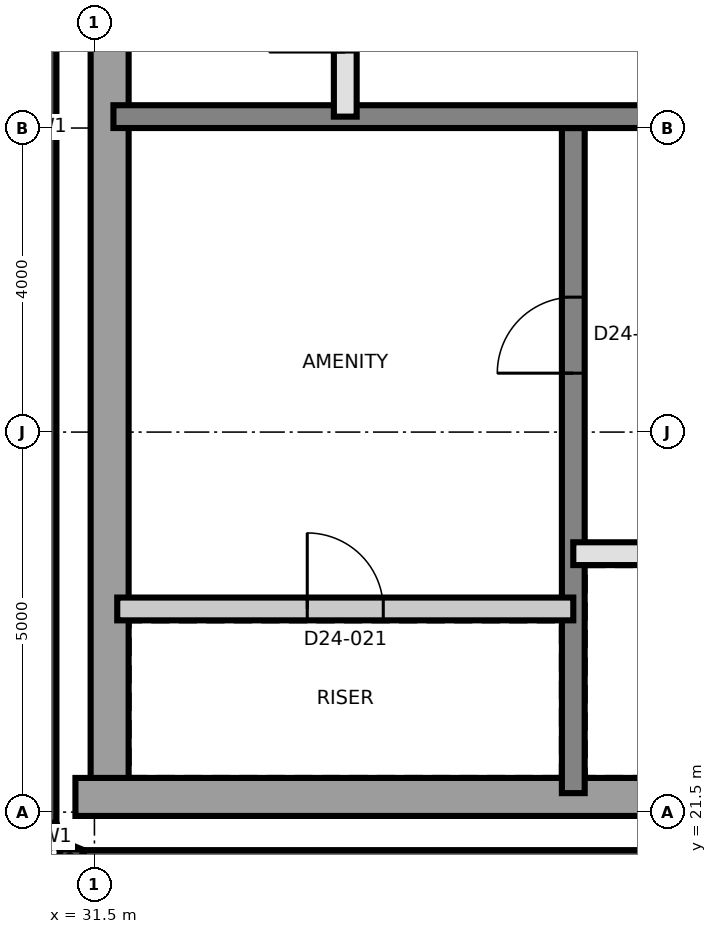
"""IFC4 building model, lengths in metres.
Left out: names, types, materials, properties, quantities, classifications, styles, units other than length and angle.
Written with IfcOpenShell. Run it as: python <this file> out.ifc"""

import sys

from ifc_helpers import new_model, si_unit, direction, frame, frame_2d, origin, place, context, subcontext, project, spatial, rectangle, extrude, element, fill, save


model = new_model("IFC4")
c1 = context("Model", 3, precision=1e-05, world=origin(), true_north=direction((0.0, 1.0)))
c2 = subcontext(c1, "Body", "Model", "MODEL_VIEW")
j1 = project(units=[si_unit("LENGTHUNIT", "METRE"), si_unit("PLANEANGLEUNIT", "RADIAN")], contexts=[c1])
p1 = place(None, origin())
s1 = spatial("IfcSite", under=j1, at=p1, CompositionType="ELEMENT")
p2 = place(p1, origin())
s2 = spatial("IfcBuilding", under=s1, at=p2, CompositionType="ELEMENT")
p3 = place(p2, frame((0.0, 0.0, 221.7)))
s3 = spatial("IfcBuildingStorey", under=s2, at=p3, CompositionType="ELEMENT", Elevation=221.7)
p4 = place(p3, frame((31.7, 21.75, 0.0), z_axis=(0.0, 0.0, 1.0), x_axis=(0.0, 1.0, 0.0)))
e1 = element("IfcWall", 1, at=p4, inside=s3, PredefinedType="SHEAR", context=c2, shape_type="SweptSolid", body=[
    extrude(rectangle(XDim=17.5, YDim=0.5, at=frame_2d((8.75, 0.0))), origin(), (0.0, 0.0, 1.0), 3.7),
])
p5 = place(p3, frame((31.25, 21.7, 0.0), z_axis=(0.0, 0.0, 1.0), x_axis=(1.0, 0.0, 0.0)))
e2 = element("IfcWall", 2, at=p5, inside=s3, PredefinedType="SHEAR", context=c2, shape_type="SweptSolid", body=[
    extrude(rectangle(XDim=27.0, YDim=0.5, at=frame_2d((13.5, 0.0))), origin(), (0.0, 0.0, 1.0), 3.7),
])
p6 = place(p3, frame((37.8, 21.75, 0.0), z_axis=(0.0, 0.0, 1.0), x_axis=(0.0, 1.0, 0.0)))
e3 = element("IfcWall", 3, at=p6, inside=s3, PredefinedType="SHEAR", context=c2, shape_type="SweptSolid", body=[
    extrude(rectangle(XDim=8.75, YDim=0.3, at=frame_2d((4.375, 0.0))), origin(), (0.0, 0.0, 1.0), 3.7),
])
p7 = place(p6, frame((5.525, 0.0, 0.0)))
e4 = element("IfcOpeningElement", 4, at=p7, cuts=e3, PredefinedType="OPENING", context=c2, shape_type="SweptSolid", body=[
    extrude(rectangle(XDim=1.0, YDim=2.1, at=frame_2d((0.5, 1.05))), frame((0.0, 0.16, 0.0), z_axis=(0.0, -1.0, 0.0), x_axis=(1.0, 0.0, 0.0)), (0.0, 0.0, 1.0), 0.32),
])
p8 = place(p3, frame((31.75, 30.65, 0.0), z_axis=(0.0, 0.0, 1.0), x_axis=(1.0, 0.0, 0.0)))
e5 = element("IfcWall", 5, at=p8, inside=s3, PredefinedType="SHEAR", context=c2, shape_type="SweptSolid", body=[
    extrude(rectangle(XDim=26.5, YDim=0.3, at=frame_2d((13.25, 0.0))), origin(), (0.0, 0.0, 1.0), 3.7),
])
p9 = place(p8, frame((24.75, 0.0, 0.0)))
e6 = element("IfcOpeningElement", 6, at=p9, cuts=e5, PredefinedType="OPENING", context=c2, shape_type="SweptSolid", body=[
    extrude(rectangle(XDim=1.0, YDim=2.1, at=frame_2d((0.5, 1.05))), frame((0.0, 0.16, 0.0), z_axis=(0.0, -1.0, 0.0), x_axis=(1.0, 0.0, 0.0)), (0.0, 0.0, 1.0), 0.32),
])
p10 = place(p3, frame((30.85, 39.67, 0.0), z_axis=(0.0, 0.0, 1.0), x_axis=(0.0, -1.0, 0.0)))
e7 = element("IfcWall", 7, at=p10, inside=s3, PredefinedType="SOLIDWALL", context=c2, shape_type="SweptSolid", body=[
    extrude(rectangle(XDim=18.31, YDim=0.3, at=frame_2d((9.155, 0.0))), origin(), (0.0, 0.0, 1.0), 3.4),
])
for number, where, z_axis, x_axis in (
    (8, (30.861, 21.302, 0.0), (0.0, 0.0, 1.0), (0.383, -0.924, 0.0)),
    (9, (31.048, 20.967, 0.0), (0.0, 0.0, 1.0), (0.924, -0.383, 0.0)),
):
    element("IfcWall", number, at=place(p3, frame(where, z_axis=z_axis, x_axis=x_axis)), inside=s3, PredefinedType="SOLIDWALL", context=c2, shape_type="SweptSolid", body=[
        extrude(rectangle(XDim=0.275, YDim=0.3, at=frame_2d((0.138, 0.0))), origin(), (0.0, 0.0, 1.0), 3.4),
    ])
p11 = place(p3, frame((31.36, 20.85, 0.0), z_axis=(0.0, 0.0, 1.0), x_axis=(1.0, 0.0, 0.0)))
e10 = element("IfcWall", 10, at=p11, inside=s3, PredefinedType="SOLIDWALL", context=c2, shape_type="SweptSolid", body=[
    extrude(rectangle(XDim=27.281, YDim=0.3, at=frame_2d((13.64, 0.0))), origin(), (0.0, 0.0, 1.0), 3.4),
])
p12 = place(p3, frame((31.8, 24.173, 0.0), z_axis=(0.0, 0.0, 1.0), x_axis=(1.0, 0.0, 0.0)))
e11 = element("IfcWall", 11, at=p12, inside=s3, PredefinedType="PARTITIONING", context=c2, shape_type="SweptSolid", body=[
    extrude(rectangle(XDim=6.0, YDim=0.3, at=frame_2d((3.0, 0.0))), origin(), (0.0, 0.0, 1.0), 3.4),
])
p13 = place(p12, frame((2.5, 0.0, 0.0)))
e12 = element("IfcOpeningElement", 12, at=p13, cuts=e11, PredefinedType="OPENING", context=c2, shape_type="SweptSolid", body=[
    extrude(rectangle(XDim=1.0, YDim=2.1, at=frame_2d((0.5, 1.05))), frame((0.0, 0.16, 0.0), z_axis=(0.0, -1.0, 0.0), x_axis=(1.0, 0.0, 0.0)), (0.0, 0.0, 1.0), 0.32),
])
p14 = place(p3, frame((37.8, 24.9, 0.0), z_axis=(0.0, 0.0, 1.0), x_axis=(1.0, 0.0, 0.0)))
e13 = element("IfcWall", 13, at=p14, inside=s3, PredefinedType="SOLIDWALL", context=c2, shape_type="SweptSolid", body=[
    extrude(rectangle(XDim=12.0, YDim=0.3, at=frame_2d((6.0, 0.0))), origin(), (0.0, 0.0, 1.0), 3.4),
])
p15 = place(p14, frame((1.05, 0.0, 0.0)))
e14 = element("IfcOpeningElement", 14, at=p15, cuts=e13, PredefinedType="OPENING", context=c2, shape_type="SweptSolid", body=[
    extrude(rectangle(XDim=0.9, YDim=2.1, at=frame_2d((0.45, 1.05))), frame((0.0, 0.16, 0.0), z_axis=(0.0, -1.0, 0.0), x_axis=(1.0, 0.0, 0.0)), (0.0, 0.0, 1.0), 0.32),
])
p16 = place(p14, frame((10.05, 0.0, 0.0)))
e15 = element("IfcOpeningElement", 15, at=p16, cuts=e13, PredefinedType="OPENING", context=c2, shape_type="SweptSolid", body=[
    extrude(rectangle(XDim=0.9, YDim=2.1, at=frame_2d((0.45, 1.05))), frame((0.0, 0.16, 0.0), z_axis=(0.0, -1.0, 0.0), x_axis=(1.0, 0.0, 0.0)), (0.0, 0.0, 1.0), 0.32),
])
p17 = place(p14, frame((3.95, 0.0, 0.0)))
e16 = element("IfcOpeningElement", 16, at=p17, cuts=e13, PredefinedType="OPENING", context=c2, shape_type="SweptSolid", body=[
    extrude(rectangle(XDim=1.1, YDim=2.4, at=frame_2d((0.55, 1.2))), frame((0.0, 0.16, 0.0), z_axis=(0.0, -1.0, 0.0), x_axis=(1.0, 0.0, 0.0)), (0.0, 0.0, 1.0), 0.32),
])
p18 = place(p14, frame((6.95, 0.0, 0.0)))
e17 = element("IfcOpeningElement", 17, at=p18, cuts=e13, PredefinedType="OPENING", context=c2, shape_type="SweptSolid", body=[
    extrude(rectangle(XDim=1.1, YDim=2.4, at=frame_2d((0.55, 1.2))), frame((0.0, 0.16, 0.0), z_axis=(0.0, -1.0, 0.0), x_axis=(1.0, 0.0, 0.0)), (0.0, 0.0, 1.0), 0.32),
])
p19 = place(p3, frame((34.8, 30.65, 0.0), z_axis=(0.0, 0.0, 1.0), x_axis=(0.0, 1.0, 0.0)))
e18 = element("IfcWall", 18, at=p19, inside=s3, PredefinedType="SOLIDWALL", context=c2, shape_type="SweptSolid", body=[
    extrude(rectangle(XDim=2.7, YDim=0.3, at=frame_2d((1.35, 0.0))), origin(), (0.0, 0.0, 1.0), 3.4),
])
p20 = place(p19, frame((0.85, 0.0, 0.0)))
e19 = element("IfcOpeningElement", 19, at=p20, cuts=e18, PredefinedType="OPENING", context=c2, shape_type="SweptSolid", body=[
    extrude(rectangle(XDim=1.0, YDim=2.1, at=frame_2d((0.5, 1.05))), frame((0.0, 0.16, 0.0), z_axis=(0.0, -1.0, 0.0), x_axis=(1.0, 0.0, 0.0)), (0.0, 0.0, 1.0), 0.32),
])
p21 = place(p7, origin())
e20 = element("IfcDoor", 20, at=p21, inside=s3, OperationType="SINGLE_SWING_LEFT", PredefinedType="DOOR", context=c2, shape_type="SweptSolid", body=[
    extrude(rectangle(XDim=1.0, YDim=2.1, at=frame_2d((0.5, 1.05))), frame((0.0, 0.025, 0.0), z_axis=(0.0, -1.0, 0.0), x_axis=(1.0, 0.0, 0.0)), (0.0, 0.0, 1.0), 0.05),
])
fill(e4, e20)
p22 = place(p13, origin())
e21 = element("IfcDoor", 21, at=p22, inside=s3, OperationType="SINGLE_SWING_RIGHT", PredefinedType="DOOR", context=c2, shape_type="SweptSolid", body=[
    extrude(rectangle(XDim=1.0, YDim=2.1, at=frame_2d((0.5, 1.05))), frame((0.0, 0.025, 0.0), z_axis=(0.0, -1.0, 0.0), x_axis=(1.0, 0.0, 0.0)), (0.0, 0.0, 1.0), 0.05),
])
fill(e12, e21)
save(model, sys.argv[1])
